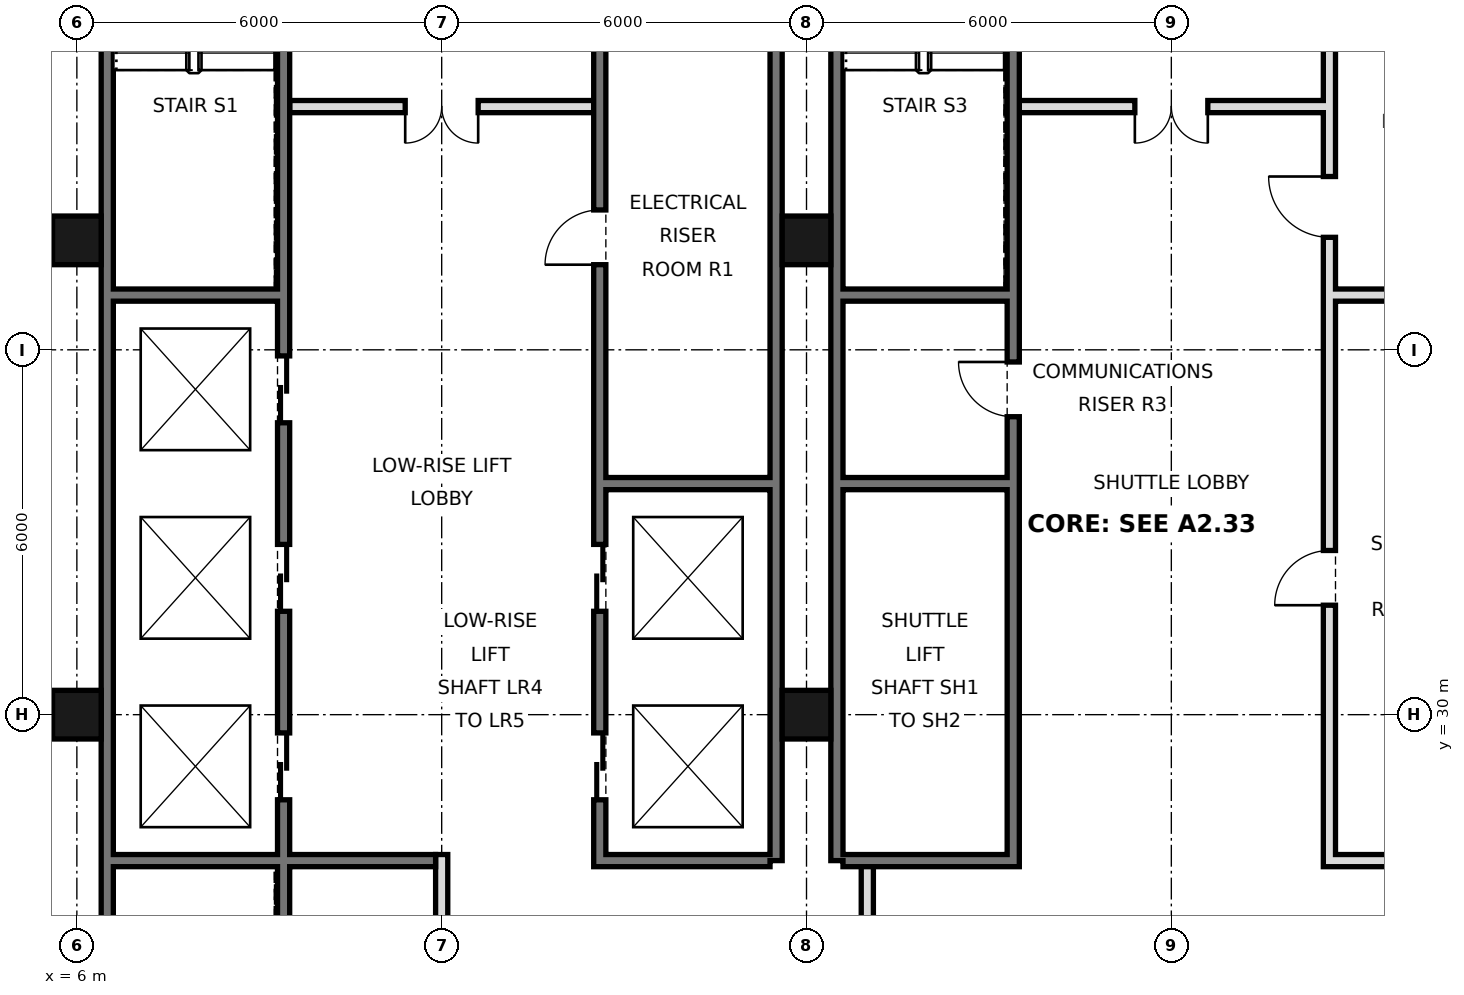
"""IFC4 building model, lengths in metres.
Left out: names, types, materials, properties, quantities, classifications, styles, units other than length and angle.
Written with IfcOpenShell. Run it as: python <this file> out.ifc"""

import sys

from ifc_helpers import new_model, si_unit, direction, frame, frame_2d, origin, origin_2d, place, context, subcontext, project, spatial, rectangle, hollow_rectangle, extrude, element, fill, save


model = new_model("IFC4")
c1 = context("Model", 3, precision=1e-05, world=origin(), true_north=direction((0.0, 1.0)))
c2 = subcontext(c1, "Body", "Model", "MODEL_VIEW")
j1 = project(units=[si_unit("LENGTHUNIT", "METRE"), si_unit("PLANEANGLEUNIT", "RADIAN")], contexts=[c1])
p1 = place(None, origin())
s1 = spatial("IfcSite", under=j1, at=p1, CompositionType="ELEMENT")
p2 = place(p1, origin())
s2 = spatial("IfcBuilding", under=s1, at=p2, CompositionType="ELEMENT")
p3 = place(p2, frame((0.0, 0.0, 130.4)))
s3 = spatial("IfcBuildingStorey", under=s2, at=p3, CompositionType="ELEMENT", Elevation=130.4)
for number, where, z_axis, x_axis in (
    (1, (6.0, 30.0, 0.0), (0.0, 0.0, 1.0), (1.0, 0.0, 0.0)),
    (2, (6.0, 37.8, 0.0), (0.0, 0.0, 1.0), (1.0, 0.0, 0.0)),
    (3, (18.0, 30.0, 0.0), (0.0, 0.0, 1.0), (1.0, 0.0, 0.0)),
    (4, (18.0, 37.8, 0.0), (0.0, 0.0, 1.0), (1.0, 0.0, 0.0)),
):
    element("IfcColumn", number, at=place(p3, frame(where, z_axis=z_axis, x_axis=x_axis)), inside=s3, PredefinedType="COLUMN", context=c2, shape_type="SweptSolid", body=[
        extrude(hollow_rectangle(XDim=0.8, YDim=0.8, WallThickness=0.05, at=origin_2d()), origin(), (0.0, 0.0, 1.0), 3.6),
    ])
p4 = place(p3, frame((6.5, 21.6, 0.0), z_axis=(0.0, 0.0, 1.0), x_axis=(0.0, 1.0, 0.0)))
e5 = element("IfcWall", 5, at=p4, inside=s3, PredefinedType="SOLIDWALL", context=c2, shape_type="SweptSolid", body=[
    extrude(rectangle(XDim=23.5, YDim=0.2, at=frame_2d((11.75, 0.0))), origin(), (0.0, 0.0, 1.0), 3.42),
])
for number, where, z_axis, x_axis in (
    (6, (17.5, 27.6, 0.0), (0.0, 0.0, 1.0), (0.0, 1.0, 0.0)),
    (7, (18.5, 27.6, 0.0), (0.0, 0.0, 1.0), (0.0, 1.0, 0.0)),
):
    element("IfcWall", number, at=place(p3, frame(where, z_axis=z_axis, x_axis=x_axis)), inside=s3, PredefinedType="SOLIDWALL", context=c2, shape_type="SweptSolid", body=[
        extrude(rectangle(XDim=17.5, YDim=0.2, at=frame_2d((8.75, 0.0))), origin(), (0.0, 0.0, 1.0), 3.42),
    ])
p5 = place(p3, frame((19.0, 21.6, 0.0), z_axis=(0.0, 0.0, 1.0), x_axis=(0.0, 1.0, 0.0)))
e8 = element("IfcWall", 8, at=p5, inside=s3, PredefinedType="PARTITIONING", context=c2, shape_type="SweptSolid", body=[
    extrude(rectangle(XDim=6.0, YDim=0.2, at=frame_2d((3.0, 0.0))), origin(), (0.0, 0.0, 1.0), 3.42),
])
p6 = place(p5, frame((2.1, 0.0, 0.0)))
e9 = element("IfcOpeningElement", 9, at=p6, cuts=e8, PredefinedType="OPENING", context=c2, shape_type="SweptSolid", body=[
    extrude(rectangle(XDim=1.8, YDim=2.1, at=frame_2d((0.9, 1.05))), frame((0.0, 0.11, 0.0), z_axis=(0.0, -1.0, 0.0), x_axis=(1.0, 0.0, 0.0)), (0.0, 0.0, 1.0), 0.22),
])
p7 = place(p3, frame((12.0, 21.6, 0.0), z_axis=(0.0, 0.0, 1.0), x_axis=(0.0, 1.0, 0.0)))
e10 = element("IfcWall", 10, at=p7, inside=s3, PredefinedType="PARTITIONING", context=c2, shape_type="SweptSolid", body=[
    extrude(rectangle(XDim=6.1, YDim=0.2, at=frame_2d((3.05, 0.0))), origin(), (0.0, 0.0, 1.0), 3.42),
])
p8 = place(p3, frame((14.6, 27.5, 0.0), z_axis=(0.0, 0.0, 1.0), x_axis=(0.0, 1.0, 0.0)))
e11 = element("IfcWall", 11, at=p8, inside=s3, PredefinedType="SOLIDWALL", context=c2, shape_type="SweptSolid", body=[
    extrude(rectangle(XDim=17.5, YDim=0.2, at=frame_2d((8.75, 0.0))), origin(), (0.0, 0.0, 1.0), 3.42),
])
p9 = place(p8, frame((1.1, 0.0, 0.0)))
e12 = element("IfcOpeningElement", 12, at=p9, cuts=e11, PredefinedType="OPENING", context=c2, shape_type="SweptSolid", body=[
    extrude(rectangle(XDim=1.1, YDim=2.1, at=frame_2d((0.55, 1.05))), frame((0.0, 0.11, 0.0), z_axis=(0.0, -1.0, 0.0), x_axis=(1.0, 0.0, 0.0)), (0.0, 0.0, 1.0), 0.22),
])
p10 = place(p8, frame((4.2, 0.0, 0.0)))
e13 = element("IfcOpeningElement", 13, at=p10, cuts=e11, PredefinedType="OPENING", context=c2, shape_type="SweptSolid", body=[
    extrude(rectangle(XDim=1.1, YDim=2.1, at=frame_2d((0.55, 1.05))), frame((0.0, 0.11, 0.0), z_axis=(0.0, -1.0, 0.0), x_axis=(1.0, 0.0, 0.0)), (0.0, 0.0, 1.0), 0.22),
])
p11 = place(p8, frame((15.4, 0.0, 0.0)))
e14 = element("IfcOpeningElement", 14, at=p11, cuts=e11, PredefinedType="OPENING", context=c2, shape_type="SweptSolid", body=[
    extrude(rectangle(XDim=1.1, YDim=2.1, at=frame_2d((0.55, 1.05))), frame((0.0, 0.11, 0.0), z_axis=(0.0, -1.0, 0.0), x_axis=(1.0, 0.0, 0.0)), (0.0, 0.0, 1.0), 0.22),
])
p12 = place(p8, frame((9.9, 0.0, 0.0)))
e15 = element("IfcOpeningElement", 15, at=p12, cuts=e11, PredefinedType="OPENING", context=c2, shape_type="SweptSolid", body=[
    extrude(rectangle(XDim=0.9, YDim=2.1, at=frame_2d((0.45, 1.05))), frame((0.0, 0.11, 0.0), z_axis=(0.0, -1.0, 0.0), x_axis=(1.0, 0.0, 0.0)), (0.0, 0.0, 1.0), 0.22),
])
p13 = place(p3, frame((21.4, 27.5, 0.0), z_axis=(0.0, 0.0, 1.0), x_axis=(0.0, 1.0, 0.0)))
e16 = element("IfcWall", 16, at=p13, inside=s3, PredefinedType="SOLIDWALL", context=c2, shape_type="SweptSolid", body=[
    extrude(rectangle(XDim=17.5, YDim=0.2, at=frame_2d((8.75, 0.0))), origin(), (0.0, 0.0, 1.0), 3.42),
])
p14 = place(p13, frame((16.2, 0.0, 0.0)))
e17 = element("IfcOpeningElement", 17, at=p14, cuts=e16, PredefinedType="OPENING", context=c2, shape_type="SweptSolid", body=[
    extrude(rectangle(XDim=1.0, YDim=2.1, at=frame_2d((0.5, 1.05))), frame((0.0, 0.11, 0.0), z_axis=(0.0, -1.0, 0.0), x_axis=(1.0, 0.0, 0.0)), (0.0, 0.0, 1.0), 0.22),
])
p15 = place(p13, frame((7.4, 0.0, 0.0)))
e18 = element("IfcOpeningElement", 18, at=p15, cuts=e16, PredefinedType="OPENING", context=c2, shape_type="SweptSolid", body=[
    extrude(rectangle(XDim=0.9, YDim=2.1, at=frame_2d((0.45, 1.05))), frame((0.0, 0.11, 0.0), z_axis=(0.0, -1.0, 0.0), x_axis=(1.0, 0.0, 0.0)), (0.0, 0.0, 1.0), 0.22),
])
p16 = place(p3, frame((26.6, 27.5, 0.0), z_axis=(0.0, 0.0, 1.0), x_axis=(0.0, 1.0, 0.0)))
e19 = element("IfcWall", 19, at=p16, inside=s3, PredefinedType="SOLIDWALL", context=c2, shape_type="SweptSolid", body=[
    extrude(rectangle(XDim=17.5, YDim=0.2, at=frame_2d((8.75, 0.0))), origin(), (0.0, 0.0, 1.0), 3.42),
])
p17 = place(p16, frame((4.3, 0.0, 0.0)))
e20 = element("IfcOpeningElement", 20, at=p17, cuts=e19, PredefinedType="OPENING", context=c2, shape_type="SweptSolid", body=[
    extrude(rectangle(XDim=0.9, YDim=2.1, at=frame_2d((0.45, 1.05))), frame((0.0, 0.11, 0.0), z_axis=(0.0, -1.0, 0.0), x_axis=(1.0, 0.0, 0.0)), (0.0, 0.0, 1.0), 0.22),
])
p18 = place(p16, frame((10.35, 0.0, 0.0)))
e21 = element("IfcOpeningElement", 21, at=p18, cuts=e19, PredefinedType="OPENING", context=c2, shape_type="SweptSolid", body=[
    extrude(rectangle(XDim=1.0, YDim=2.1, at=frame_2d((0.5, 1.05))), frame((0.0, 0.11, 0.0), z_axis=(0.0, -1.0, 0.0), x_axis=(1.0, 0.0, 0.0)), (0.0, 0.0, 1.0), 0.22),
])
p19 = place(p16, frame((15.475, 0.0, 0.0)))
e22 = element("IfcOpeningElement", 22, at=p19, cuts=e19, PredefinedType="OPENING", context=c2, shape_type="SweptSolid", body=[
    extrude(rectangle(XDim=1.0, YDim=2.1, at=frame_2d((0.5, 1.05))), frame((0.0, 0.11, 0.0), z_axis=(0.0, -1.0, 0.0), x_axis=(1.0, 0.0, 0.0)), (0.0, 0.0, 1.0), 0.22),
])
p20 = place(p3, frame((9.4, 21.6, 0.0), z_axis=(0.0, 0.0, 1.0), x_axis=(0.0, 1.0, 0.0)))
e23 = element("IfcWall", 23, at=p20, inside=s3, PredefinedType="SOLIDWALL", context=c2, shape_type="SweptSolid", body=[
    extrude(rectangle(XDim=23.4, YDim=0.2, at=frame_2d((11.7, 0.0))), origin(), (0.0, 0.0, 1.0), 3.42),
])
p21 = place(p20, frame((7.0, 0.0, 0.0)))
e24 = element("IfcOpeningElement", 24, at=p21, cuts=e23, PredefinedType="OPENING", context=c2, shape_type="SweptSolid", body=[
    extrude(rectangle(XDim=1.1, YDim=2.1, at=frame_2d((0.55, 1.05))), frame((0.0, 0.11, 0.0), z_axis=(0.0, -1.0, 0.0), x_axis=(1.0, 0.0, 0.0)), (0.0, 0.0, 1.0), 0.22),
])
p22 = place(p20, frame((10.1, 0.0, 0.0)))
e25 = element("IfcOpeningElement", 25, at=p22, cuts=e23, PredefinedType="OPENING", context=c2, shape_type="SweptSolid", body=[
    extrude(rectangle(XDim=1.1, YDim=2.1, at=frame_2d((0.55, 1.05))), frame((0.0, 0.11, 0.0), z_axis=(0.0, -1.0, 0.0), x_axis=(1.0, 0.0, 0.0)), (0.0, 0.0, 1.0), 0.22),
])
p23 = place(p20, frame((13.2, 0.0, 0.0)))
e26 = element("IfcOpeningElement", 26, at=p23, cuts=e23, PredefinedType="OPENING", context=c2, shape_type="SweptSolid", body=[
    extrude(rectangle(XDim=1.1, YDim=2.1, at=frame_2d((0.55, 1.05))), frame((0.0, 0.11, 0.0), z_axis=(0.0, -1.0, 0.0), x_axis=(1.0, 0.0, 0.0)), (0.0, 0.0, 1.0), 0.22),
])
p24 = place(p20, frame((22.1, 0.0, 0.0)))
e27 = element("IfcOpeningElement", 27, at=p24, cuts=e23, PredefinedType="OPENING", context=c2, shape_type="SweptSolid", body=[
    extrude(rectangle(XDim=1.0, YDim=2.1, at=frame_2d((0.5, 1.05))), frame((0.0, 0.11, 0.0), z_axis=(0.0, -1.0, 0.0), x_axis=(1.0, 0.0, 0.0)), (0.0, 0.0, 1.0), 0.22),
])
p25 = place(p20, frame((0.175, 0.0, 0.0)))
e28 = element("IfcOpeningElement", 28, at=p25, cuts=e23, PredefinedType="OPENING", context=c2, shape_type="SweptSolid", body=[
    extrude(rectangle(XDim=0.9, YDim=2.1, at=frame_2d((0.45, 1.05))), frame((0.0, 0.11, 0.0), z_axis=(0.0, -1.0, 0.0), x_axis=(1.0, 0.0, 0.0)), (0.0, 0.0, 1.0), 0.22),
])
for number, where, z_axis, x_axis in (
    (29, (14.7, 27.6, 0.0), (0.0, 0.0, 1.0), (1.0, 0.0, 0.0)),
    (30, (18.6, 27.6, 0.0), (0.0, 0.0, 1.0), (1.0, 0.0, 0.0)),
    (31, (26.7, 27.6, 0.0), (0.0, 0.0, 1.0), (1.0, 0.0, 0.0)),
):
    element("IfcWall", number, at=place(p3, frame(where, z_axis=z_axis, x_axis=x_axis)), inside=s3, PredefinedType="SOLIDWALL", context=c2, shape_type="SweptSolid", body=[
        extrude(rectangle(XDim=2.7, YDim=0.2, at=frame_2d((1.35, 0.0))), origin(), (0.0, 0.0, 1.0), 3.42),
    ])
p26 = place(p3, frame((6.6, 27.6, 0.0), z_axis=(0.0, 0.0, 1.0), x_axis=(1.0, 0.0, 0.0)))
e32 = element("IfcWall", 32, at=p26, inside=s3, PredefinedType="SOLIDWALL", context=c2, shape_type="SweptSolid", body=[
    extrude(rectangle(XDim=5.3, YDim=0.2, at=frame_2d((2.65, 0.0))), origin(), (0.0, 0.0, 1.0), 3.42),
])
for number, where, z_axis, x_axis in (
    (33, (14.7, 33.8, 0.0), (0.0, 0.0, 1.0), (1.0, 0.0, 0.0)),
    (34, (18.6, 33.8, 0.0), (0.0, 0.0, 1.0), (1.0, 0.0, 0.0)),
    (35, (18.6, 36.9, 0.0), (0.0, 0.0, 1.0), (1.0, 0.0, 0.0)),
    (36, (26.7, 36.9, 0.0), (0.0, 0.0, 1.0), (1.0, 0.0, 0.0)),
    (37, (6.6, 36.9, 0.0), (0.0, 0.0, 1.0), (1.0, 0.0, 0.0)),
):
    element("IfcWall", number, at=place(p3, frame(where, z_axis=z_axis, x_axis=x_axis)), inside=s3, PredefinedType="SOLIDWALL", context=c2, shape_type="SweptSolid", body=[
        extrude(rectangle(XDim=2.7, YDim=0.2, at=frame_2d((1.35, 0.0))), origin(), (0.0, 0.0, 1.0), 3.42),
    ])
p27 = place(p3, frame((21.5, 40.0, 0.0), z_axis=(0.0, 0.0, 1.0), x_axis=(1.0, 0.0, 0.0)))
e38 = element("IfcWall", 38, at=p27, inside=s3, PredefinedType="PARTITIONING", context=c2, shape_type="SweptSolid", body=[
    extrude(rectangle(XDim=5.0, YDim=0.2, at=frame_2d((2.5, 0.0))), origin(), (0.0, 0.0, 1.0), 3.42),
])
p28 = place(p27, frame((1.9, 0.0, 0.0)))
e39 = element("IfcOpeningElement", 39, at=p28, cuts=e38, PredefinedType="OPENING", context=c2, shape_type="SweptSolid", body=[
    extrude(rectangle(XDim=1.2, YDim=2.1, at=frame_2d((0.6, 1.05))), frame((0.0, 0.11, 0.0), z_axis=(0.0, -1.0, 0.0), x_axis=(1.0, 0.0, 0.0)), (0.0, 0.0, 1.0), 0.22),
])
p29 = place(p3, frame((9.5, 40.0, 0.0), z_axis=(0.0, 0.0, 1.0), x_axis=(1.0, 0.0, 0.0)))
e40 = element("IfcWall", 40, at=p29, inside=s3, PredefinedType="PARTITIONING", context=c2, shape_type="SweptSolid", body=[
    extrude(rectangle(XDim=5.0, YDim=0.2, at=frame_2d((2.5, 0.0))), origin(), (0.0, 0.0, 1.0), 3.42),
])
p30 = place(p29, frame((1.9, 0.0, 0.0)))
e41 = element("IfcOpeningElement", 41, at=p30, cuts=e40, PredefinedType="OPENING", context=c2, shape_type="SweptSolid", body=[
    extrude(rectangle(XDim=1.2, YDim=2.1, at=frame_2d((0.6, 1.05))), frame((0.0, 0.11, 0.0), z_axis=(0.0, -1.0, 0.0), x_axis=(1.0, 0.0, 0.0)), (0.0, 0.0, 1.0), 0.22),
])
p31 = place(p30, frame((1.2, 0.0, 0.0), z_axis=(0.0, 0.0, 1.0), x_axis=(-1.0, 0.0, 0.0)))
e42 = element("IfcDoor", 42, at=p31, inside=s3, OperationType="DOUBLE_DOOR_SINGLE_SWING", PredefinedType="DOOR", context=c2, shape_type="SweptSolid", body=[
    extrude(rectangle(XDim=1.2, YDim=2.1, at=frame_2d((0.6, 1.05))), frame((0.0, 0.025, 0.0), z_axis=(0.0, -1.0, 0.0), x_axis=(1.0, 0.0, 0.0)), (0.0, 0.0, 1.0), 0.05),
])
fill(e41, e42)
p32 = place(p28, frame((1.2, 0.0, 0.0), z_axis=(0.0, 0.0, 1.0), x_axis=(-1.0, 0.0, 0.0)))
e43 = element("IfcDoor", 43, at=p32, inside=s3, OperationType="DOUBLE_DOOR_SINGLE_SWING", PredefinedType="DOOR", context=c2, shape_type="SweptSolid", body=[
    extrude(rectangle(XDim=1.2, YDim=2.1, at=frame_2d((0.6, 1.05))), frame((0.0, 0.025, 0.0), z_axis=(0.0, -1.0, 0.0), x_axis=(1.0, 0.0, 0.0)), (0.0, 0.0, 1.0), 0.05),
])
fill(e39, e43)
p33 = place(p9, origin())
e44 = element("IfcDoor", 44, at=p33, inside=s3, OperationType="DOUBLE_DOOR_SLIDING", PredefinedType="DOOR", context=c2, shape_type="SweptSolid", body=[
    extrude(rectangle(XDim=1.1, YDim=2.1, at=frame_2d((0.55, 1.05))), frame((0.0, 0.025, 0.0), z_axis=(0.0, -1.0, 0.0), x_axis=(1.0, 0.0, 0.0)), (0.0, 0.0, 1.0), 0.05),
])
fill(e12, e44)
p34 = place(p10, origin())
e45 = element("IfcDoor", 45, at=p34, inside=s3, OperationType="DOUBLE_DOOR_SLIDING", PredefinedType="DOOR", context=c2, shape_type="SweptSolid", body=[
    extrude(rectangle(XDim=1.1, YDim=2.1, at=frame_2d((0.55, 1.05))), frame((0.0, 0.025, 0.0), z_axis=(0.0, -1.0, 0.0), x_axis=(1.0, 0.0, 0.0)), (0.0, 0.0, 1.0), 0.05),
])
fill(e13, e45)
p35 = place(p21, origin())
e46 = element("IfcDoor", 46, at=p35, inside=s3, OperationType="DOUBLE_DOOR_SLIDING", PredefinedType="DOOR", context=c2, shape_type="SweptSolid", body=[
    extrude(rectangle(XDim=1.1, YDim=2.1, at=frame_2d((0.55, 1.05))), frame((0.0, 0.025, 0.0), z_axis=(0.0, -1.0, 0.0), x_axis=(1.0, 0.0, 0.0)), (0.0, 0.0, 1.0), 0.05),
])
fill(e24, e46)
p36 = place(p22, origin())
e47 = element("IfcDoor", 47, at=p36, inside=s3, OperationType="DOUBLE_DOOR_SLIDING", PredefinedType="DOOR", context=c2, shape_type="SweptSolid", body=[
    extrude(rectangle(XDim=1.1, YDim=2.1, at=frame_2d((0.55, 1.05))), frame((0.0, 0.025, 0.0), z_axis=(0.0, -1.0, 0.0), x_axis=(1.0, 0.0, 0.0)), (0.0, 0.0, 1.0), 0.05),
])
fill(e25, e47)
p37 = place(p23, origin())
e48 = element("IfcDoor", 48, at=p37, inside=s3, OperationType="DOUBLE_DOOR_SLIDING", PredefinedType="DOOR", context=c2, shape_type="SweptSolid", body=[
    extrude(rectangle(XDim=1.1, YDim=2.1, at=frame_2d((0.55, 1.05))), frame((0.0, 0.025, 0.0), z_axis=(0.0, -1.0, 0.0), x_axis=(1.0, 0.0, 0.0)), (0.0, 0.0, 1.0), 0.05),
])
fill(e26, e48)
p38 = place(p12, origin())
e49 = element("IfcDoor", 49, at=p38, inside=s3, OperationType="SINGLE_SWING_LEFT", PredefinedType="DOOR", context=c2, shape_type="SweptSolid", body=[
    extrude(rectangle(XDim=0.9, YDim=2.1, at=frame_2d((0.45, 1.05))), frame((0.0, 0.025, 0.0), z_axis=(0.0, -1.0, 0.0), x_axis=(1.0, 0.0, 0.0)), (0.0, 0.0, 1.0), 0.05),
])
fill(e15, e49)
p39 = place(p15, frame((0.9, 0.0, 0.0), z_axis=(0.0, 0.0, 1.0), x_axis=(-1.0, 0.0, 0.0)))
e50 = element("IfcDoor", 50, at=p39, inside=s3, OperationType="SINGLE_SWING_LEFT", PredefinedType="DOOR", context=c2, shape_type="SweptSolid", body=[
    extrude(rectangle(XDim=0.9, YDim=2.1, at=frame_2d((0.45, 1.05))), frame((0.0, 0.025, 0.0), z_axis=(0.0, -1.0, 0.0), x_axis=(1.0, 0.0, 0.0)), (0.0, 0.0, 1.0), 0.05),
])
fill(e18, e50)
p40 = place(p17, origin())
e51 = element("IfcDoor", 51, at=p40, inside=s3, OperationType="SINGLE_SWING_LEFT", PredefinedType="DOOR", context=c2, shape_type="SweptSolid", body=[
    extrude(rectangle(XDim=0.9, YDim=2.1, at=frame_2d((0.45, 1.05))), frame((0.0, 0.025, 0.0), z_axis=(0.0, -1.0, 0.0), x_axis=(1.0, 0.0, 0.0)), (0.0, 0.0, 1.0), 0.05),
])
fill(e20, e51)
p41 = place(p18, frame((1.0, 0.0, 0.0), z_axis=(0.0, 0.0, 1.0), x_axis=(-1.0, 0.0, 0.0)))
e52 = element("IfcDoor", 52, at=p41, inside=s3, OperationType="SINGLE_SWING_LEFT", PredefinedType="DOOR", context=c2, shape_type="SweptSolid", body=[
    extrude(rectangle(XDim=1.0, YDim=2.1, at=frame_2d((0.5, 1.05))), frame((0.0, 0.025, 0.0), z_axis=(0.0, -1.0, 0.0), x_axis=(1.0, 0.0, 0.0)), (0.0, 0.0, 1.0), 0.05),
])
fill(e21, e52)
save(model, sys.argv[1])
